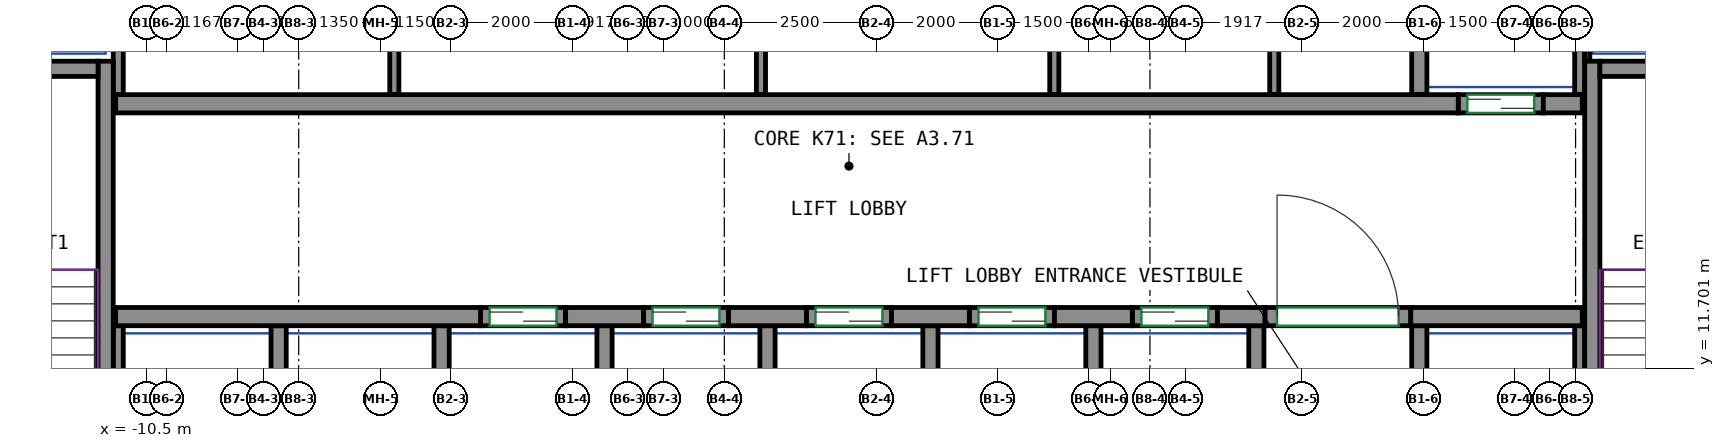
"""IFC4 building model, lengths in metres.
Left out: names, types, materials, properties, quantities, classifications, styles, units other than length and angle.
Written with IfcOpenShell. Run it as: python <this file> out.ifc"""

import sys

from ifc_helpers import new_model, si_unit, direction, frame, frame_2d, origin, place, context, subcontext, project, spatial, rectangle, extrude, source, transform, mapped, element, fill, save


model = new_model("IFC4")
c1 = context("Model", 3, precision=1e-05, world=origin(), true_north=direction((0.0, 1.0)))
c2 = subcontext(c1, "Body", "Model", "MODEL_VIEW")
j1 = project(units=[si_unit("LENGTHUNIT", "METRE"), si_unit("PLANEANGLEUNIT", "RADIAN")], contexts=[c1])
p1 = place(None, origin())
s1 = spatial("IfcSite", under=j1, at=p1, CompositionType="ELEMENT")
p2 = place(p1, origin())
s2 = spatial("IfcBuilding", under=s1, at=p2, CompositionType="ELEMENT")
p3 = place(p2, frame((0.0, 0.0, 284.0)))
s3 = spatial("IfcBuildingStorey", under=s2, at=p3, CompositionType="ELEMENT", Elevation=284.0)
m1 = source(origin(), c2, "Body", "SweptSolid", [
    extrude(rectangle(XDim=7.75, YDim=0.25, at=frame_2d((3.875, 0.0))), origin(), (0.0, 0.0, 1.0), 3.12),
])
p4 = place(p3, frame((-11.175, 9.0, 0.0), z_axis=(0.0, 0.0, 1.0), x_axis=(0.0, 1.0, 0.0)))
e1 = element("IfcWall", 1, at=p4, inside=s3, PredefinedType="SHEAR", context=c2, shape_type="MappedRepresentation", body=[
    mapped(m1, transform((0.0, 0.0, 0.0))),
])
m2 = source(origin(), c2, "Body", "SweptSolid", [
    extrude(rectangle(XDim=3.7, YDim=0.25, at=frame_2d((1.85, 0.0))), origin(), (0.0, 0.0, 1.0), 3.12),
])
p5 = place(p3, frame((-15.0, 16.625, 0.0), z_axis=(0.0, 0.0, 1.0), x_axis=(1.0, 0.0, 0.0)))
e2 = element("IfcWall", 2, at=p5, inside=s3, PredefinedType="SHEAR", context=c2, shape_type="MappedRepresentation", body=[
    mapped(m2, transform((0.0, 0.0, 0.0))),
])
p6 = place(p3, frame((13.275, 9.0, 0.0), z_axis=(0.0, 0.0, 1.0), x_axis=(0.0, 1.0, 0.0)))
e3 = element("IfcWall", 3, at=p6, inside=s3, PredefinedType="SHEAR", context=c2, shape_type="MappedRepresentation", body=[
    mapped(m1, transform((0.0, 0.0, 0.0))),
])
m3 = source(origin(), c2, "Body", "SweptSolid", [
    extrude(rectangle(XDim=3.7, YDim=0.25, at=frame_2d((1.85, 0.0))), origin(), (0.0, 0.0, 1.0), 3.12),
])
p7 = place(p3, frame((13.4, 16.625, 0.0), z_axis=(0.0, 0.0, 1.0), x_axis=(1.0, 0.0, 0.0)))
e4 = element("IfcWall", 4, at=p7, inside=s3, PredefinedType="SHEAR", context=c2, shape_type="MappedRepresentation", body=[
    mapped(m3, transform((0.0, 0.0, 0.0))),
])
m4 = source(origin(), c2, "Body", "SweptSolid", [
    extrude(rectangle(XDim=6.0, YDim=0.3, at=frame_2d((3.0, 0.0))), origin(), (0.0, 0.0, 1.0), 3.12),
])
p8 = place(p3, frame((-11.01, 12.55, 0.0), z_axis=(0.0, 0.0, 1.0), x_axis=(1.0, 0.0, 0.0)))
e5 = element("IfcWall", 5, at=p8, inside=s3, PredefinedType="SHEAR", context=c2, shape_type="MappedRepresentation", body=[
    mapped(m4, transform((0.0, 0.0, 0.0))),
])
m5 = source(origin(), c2, "Body", "SweptSolid", [
    extrude(rectangle(XDim=1.28, YDim=0.3, at=frame_2d((0.64, 0.0))), origin(), (0.0, 0.0, 1.0), 3.12),
])
for number, where, z_axis, x_axis in (
    (6, (-3.61, 12.55, 0.0), (0.0, 0.0, 1.0), (1.0, 0.0, 0.0)),
    (7, (-0.93, 12.55, 0.0), (0.0, 0.0, 1.0), (1.0, 0.0, 0.0)),
    (8, (1.75, 12.55, 0.0), (0.0, 0.0, 1.0), (1.0, 0.0, 0.0)),
    (9, (4.43, 12.55, 0.0), (0.0, 0.0, 1.0), (1.0, 0.0, 0.0)),
):
    element("IfcWall", number, at=place(p3, frame(where, z_axis=z_axis, x_axis=x_axis)), inside=s3, PredefinedType="SHEAR", context=c2, shape_type="MappedRepresentation", body=[
        mapped(m5, transform((0.0, 0.0, 0.0))),
    ])
m6 = source(origin(), c2, "Body", "SweptSolid", [
    extrude(rectangle(XDim=0.78, YDim=0.3, at=frame_2d((0.39, 0.0))), origin(), (0.0, 0.0, 1.0), 3.12),
])
p9 = place(p3, frame((7.11, 12.55, 0.0), z_axis=(0.0, 0.0, 1.0), x_axis=(1.0, 0.0, 0.0)))
e10 = element("IfcWall", 10, at=p9, inside=s3, PredefinedType="SHEAR", context=c2, shape_type="MappedRepresentation", body=[
    mapped(m6, transform((0.0, 0.0, 0.0))),
])
m7 = source(origin(), c2, "Body", "SweptSolid", [
    extrude(rectangle(XDim=2.82, YDim=0.3, at=frame_2d((1.41, 0.0))), origin(), (0.0, 0.0, 1.0), 3.12),
])
p10 = place(p3, frame((10.29, 12.55, 0.0), z_axis=(0.0, 0.0, 1.0), x_axis=(1.0, 0.0, 0.0)))
e11 = element("IfcWall", 11, at=p10, inside=s3, PredefinedType="SHEAR", context=c2, shape_type="MappedRepresentation", body=[
    mapped(m7, transform((0.0, 0.0, 0.0))),
])
m8 = source(origin(), c2, "Body", "SweptSolid", [
    extrude(rectangle(XDim=22.08, YDim=0.3, at=frame_2d((11.04, 0.0))), origin(), (0.0, 0.0, 1.0), 3.12),
])
p11 = place(p3, frame((-11.01, 16.05, 0.0), z_axis=(0.0, 0.0, 1.0), x_axis=(1.0, 0.0, 0.0)))
e12 = element("IfcWall", 12, at=p11, inside=s3, PredefinedType="SHEAR", context=c2, shape_type="MappedRepresentation", body=[
    mapped(m8, transform((0.0, 0.0, 0.0))),
])
m9 = source(origin(), c2, "Body", "SweptSolid", [
    extrude(rectangle(XDim=0.64, YDim=0.3, at=frame_2d((0.32, 0.0))), origin(), (0.0, 0.0, 1.0), 3.12),
])
p12 = place(p3, frame((12.47, 16.05, 0.0), z_axis=(0.0, 0.0, 1.0), x_axis=(1.0, 0.0, 0.0)))
e13 = element("IfcWall", 13, at=p12, inside=s3, PredefinedType="SHEAR", context=c2, shape_type="MappedRepresentation", body=[
    mapped(m9, transform((0.0, 0.0, 0.0))),
])
m10 = source(origin(), c2, "Body", "SweptSolid", [
    extrude(rectangle(XDim=1.4, YDim=0.3, at=frame_2d((0.7, 0.0))), origin(), (0.0, 0.0, 1.0), 3.12),
])
p13 = place(p3, frame((-5.01, 12.55, 0.0), z_axis=(0.0, 0.0, 1.0), x_axis=(1.0, 0.0, 0.0)))
e14 = element("IfcWall", 14, at=p13, inside=s3, PredefinedType="PARTITIONING", context=c2, shape_type="MappedRepresentation", body=[
    mapped(m10, transform((0.0, 0.0, 0.0))),
])
p14 = place(p13, frame((0.15, 0.0, 0.0)))
e15 = element("IfcOpeningElement", 15, at=p14, cuts=e14, PredefinedType="OPENING", context=c2, shape_type="SweptSolid", body=[
    extrude(rectangle(XDim=1.1, YDim=2.1, at=frame_2d((0.55, 1.05))), frame((0.0, 0.16, 0.0), z_axis=(0.0, -1.0, 0.0), x_axis=(1.0, 0.0, 0.0)), (0.0, 0.0, 1.0), 0.32),
])
m11 = source(origin(), c2, "Body", "SweptSolid", [
    extrude(rectangle(XDim=1.4, YDim=0.3, at=frame_2d((0.7, 0.0))), origin(), (0.0, 0.0, 1.0), 3.12),
])
p15 = place(p3, frame((-2.33, 12.55, 0.0), z_axis=(0.0, 0.0, 1.0), x_axis=(1.0, 0.0, 0.0)))
e16 = element("IfcWall", 16, at=p15, inside=s3, PredefinedType="PARTITIONING", context=c2, shape_type="MappedRepresentation", body=[
    mapped(m11, transform((0.0, 0.0, 0.0))),
])
p16 = place(p15, frame((0.15, 0.0, 0.0)))
e17 = element("IfcOpeningElement", 17, at=p16, cuts=e16, PredefinedType="OPENING", context=c2, shape_type="SweptSolid", body=[
    extrude(rectangle(XDim=1.1, YDim=2.1, at=frame_2d((0.55, 1.05))), frame((0.0, 0.16, 0.0), z_axis=(0.0, -1.0, 0.0), x_axis=(1.0, 0.0, 0.0)), (0.0, 0.0, 1.0), 0.32),
])
p17 = place(p3, frame((0.35, 12.55, 0.0), z_axis=(0.0, 0.0, 1.0), x_axis=(1.0, 0.0, 0.0)))
e18 = element("IfcWall", 18, at=p17, inside=s3, PredefinedType="PARTITIONING", context=c2, shape_type="MappedRepresentation", body=[
    mapped(m10, transform((0.0, 0.0, 0.0))),
])
p18 = place(p17, frame((0.15, 0.0, 0.0)))
e19 = element("IfcOpeningElement", 19, at=p18, cuts=e18, PredefinedType="OPENING", context=c2, shape_type="SweptSolid", body=[
    extrude(rectangle(XDim=1.1, YDim=2.1, at=frame_2d((0.55, 1.05))), frame((0.0, 0.16, 0.0), z_axis=(0.0, -1.0, 0.0), x_axis=(1.0, 0.0, 0.0)), (0.0, 0.0, 1.0), 0.32),
])
p19 = place(p3, frame((3.03, 12.55, 0.0), z_axis=(0.0, 0.0, 1.0), x_axis=(1.0, 0.0, 0.0)))
e20 = element("IfcWall", 20, at=p19, inside=s3, PredefinedType="PARTITIONING", context=c2, shape_type="MappedRepresentation", body=[
    mapped(m10, transform((0.0, 0.0, 0.0))),
])
p20 = place(p19, frame((0.15, 0.0, 0.0)))
e21 = element("IfcOpeningElement", 21, at=p20, cuts=e20, PredefinedType="OPENING", context=c2, shape_type="SweptSolid", body=[
    extrude(rectangle(XDim=1.1, YDim=2.1, at=frame_2d((0.55, 1.05))), frame((0.0, 0.16, 0.0), z_axis=(0.0, -1.0, 0.0), x_axis=(1.0, 0.0, 0.0)), (0.0, 0.0, 1.0), 0.32),
])
p21 = place(p3, frame((5.71, 12.55, 0.0), z_axis=(0.0, 0.0, 1.0), x_axis=(1.0, 0.0, 0.0)))
e22 = element("IfcWall", 22, at=p21, inside=s3, PredefinedType="PARTITIONING", context=c2, shape_type="MappedRepresentation", body=[
    mapped(m11, transform((0.0, 0.0, 0.0))),
])
p22 = place(p21, frame((0.15, 0.0, 0.0)))
e23 = element("IfcOpeningElement", 23, at=p22, cuts=e22, PredefinedType="OPENING", context=c2, shape_type="SweptSolid", body=[
    extrude(rectangle(XDim=1.1, YDim=2.1, at=frame_2d((0.55, 1.05))), frame((0.0, 0.16, 0.0), z_axis=(0.0, -1.0, 0.0), x_axis=(1.0, 0.0, 0.0)), (0.0, 0.0, 1.0), 0.32),
])
p23 = place(p3, frame((11.07, 16.05, 0.0), z_axis=(0.0, 0.0, 1.0), x_axis=(1.0, 0.0, 0.0)))
e24 = element("IfcWall", 24, at=p23, inside=s3, PredefinedType="PARTITIONING", context=c2, shape_type="MappedRepresentation", body=[
    mapped(m10, transform((0.0, 0.0, 0.0))),
])
p24 = place(p23, frame((0.15, 0.0, 0.0)))
e25 = element("IfcOpeningElement", 25, at=p24, cuts=e24, PredefinedType="OPENING", context=c2, shape_type="SweptSolid", body=[
    extrude(rectangle(XDim=1.1, YDim=2.1, at=frame_2d((0.55, 1.05))), frame((0.0, 0.16, 0.0), z_axis=(0.0, -1.0, 0.0), x_axis=(1.0, 0.0, 0.0)), (0.0, 0.0, 1.0), 0.32),
])
m12 = source(origin(), c2, "Body", "SweptSolid", [
    extrude(rectangle(XDim=2.4, YDim=0.3, at=frame_2d((1.2, 0.0))), origin(), (0.0, 0.0, 1.0), 3.12),
])
p25 = place(p3, frame((7.89, 12.55, 0.0), z_axis=(0.0, 0.0, 1.0), x_axis=(1.0, 0.0, 0.0)))
e26 = element("IfcWall", 26, at=p25, inside=s3, PredefinedType="PARTITIONING", context=c2, shape_type="MappedRepresentation", body=[
    mapped(m12, transform((0.0, 0.0, 0.0))),
])
p26 = place(p25, frame((0.2, 0.0, 0.0)))
e27 = element("IfcOpeningElement", 27, at=p26, cuts=e26, PredefinedType="OPENING", context=c2, shape_type="SweptSolid", body=[
    extrude(rectangle(XDim=2.0, YDim=2.1, at=frame_2d((1.0, 1.05))), frame((0.0, 0.16, 0.0), z_axis=(0.0, -1.0, 0.0), x_axis=(1.0, 0.0, 0.0)), (0.0, 0.0, 1.0), 0.32),
])
m13 = source(origin(), c2, "Body", "SweptSolid", [
    extrude(rectangle(XDim=3.275, YDim=0.165, at=frame_2d((1.638, 0.0))), origin(), (0.0, 0.0, 1.0), 3.12),
])
p27 = place(p3, frame((13.067, 16.2, 0.0), z_axis=(0.0, 0.0, 1.0), x_axis=(0.0, 1.0, 0.0)))
e28 = element("IfcWall", 28, at=p27, inside=s3, PredefinedType="PARTITIONING", context=c2, shape_type="MappedRepresentation", body=[
    mapped(m13, transform((0.0, 0.0, 0.0))),
])
m14 = source(origin(), c2, "Body", "SweptSolid", [
    extrude(rectangle(XDim=4.8, YDim=0.165, at=frame_2d((2.4, 0.0))), origin(), (0.0, 0.0, 1.0), 3.12),
])
p28 = place(p3, frame((-10.968, 16.2, 0.0), z_axis=(0.0, 0.0, 1.0), x_axis=(0.0, 1.0, 0.0)))
e29 = element("IfcWall", 29, at=p28, inside=s3, PredefinedType="PARTITIONING", context=c2, shape_type="MappedRepresentation", body=[
    mapped(m14, transform((0.0, 0.0, 0.0))),
])
m15 = source(origin(), c2, "Body", "SweptSolid", [
    extrude(rectangle(XDim=3.275, YDim=0.25, at=frame_2d((1.638, 0.0))), origin(), (0.0, 0.0, 1.0), 3.12),
])
p29 = place(p3, frame((10.43, 16.2, 0.0), z_axis=(0.0, 0.0, 1.0), x_axis=(0.0, 1.0, 0.0)))
e30 = element("IfcWall", 30, at=p29, inside=s3, PredefinedType="PARTITIONING", context=c2, shape_type="MappedRepresentation", body=[
    mapped(m15, transform((0.0, 0.0, 0.0))),
])
m16 = source(origin(), c2, "Body", "SweptSolid", [
    extrude(rectangle(XDim=2.725, YDim=0.085, at=frame_2d((1.363, 0.0))), origin(), (0.0, 0.0, 1.0), 3.12),
])
p30 = place(p3, frame((13.192, 16.75, 0.0), z_axis=(0.0, 0.0, 1.0), x_axis=(0.0, 1.0, 0.0)))
e31 = element("IfcWall", 31, at=p30, inside=s3, PredefinedType="PARTITIONING", context=c2, shape_type="MappedRepresentation", body=[
    mapped(m16, transform((0.0, 0.0, 0.0))),
])
m17 = source(origin(), c2, "Body", "SweptSolid", [
    extrude(rectangle(XDim=3.4, YDim=0.25, at=frame_2d((1.7, 0.0))), origin(), (0.0, 0.0, 1.0), 3.12),
])
p31 = place(p3, frame((10.43, 9.0, 0.0), z_axis=(0.0, 0.0, 1.0), x_axis=(0.0, 1.0, 0.0)))
e32 = element("IfcWall", 32, at=p31, inside=s3, PredefinedType="PARTITIONING", context=c2, shape_type="MappedRepresentation", body=[
    mapped(m17, transform((0.0, 0.0, 0.0))),
])
m18 = source(origin(), c2, "Body", "SweptSolid", [
    extrude(rectangle(XDim=3.4, YDim=0.165, at=frame_2d((1.7, 0.0))), origin(), (0.0, 0.0, 1.0), 3.12),
])
p32 = place(p3, frame((13.067, 9.0, 0.0), z_axis=(0.0, 0.0, 1.0), x_axis=(0.0, 1.0, 0.0)))
e33 = element("IfcWall", 33, at=p32, inside=s3, PredefinedType="PARTITIONING", context=c2, shape_type="MappedRepresentation", body=[
    mapped(m18, transform((0.0, 0.0, 0.0))),
])
for number, where, z_axis, x_axis in (
    (34, (2.39, 9.0, 0.0), (0.0, 0.0, 1.0), (0.0, 1.0, 0.0)),
    (35, (5.07, 9.0, 0.0), (0.0, 0.0, 1.0), (0.0, 1.0, 0.0)),
    (36, (7.75, 9.0, 0.0), (0.0, 0.0, 1.0), (0.0, 1.0, 0.0)),
    (37, (-0.29, 9.0, 0.0), (0.0, 0.0, 1.0), (0.0, 1.0, 0.0)),
):
    element("IfcWall", number, at=place(p3, frame(where, z_axis=z_axis, x_axis=x_axis)), inside=s3, PredefinedType="PARTITIONING", context=c2, shape_type="MappedRepresentation", body=[
        mapped(m17, transform((0.0, 0.0, 0.0))),
    ])
p33 = place(p3, frame((-10.968, 9.0, 0.0), z_axis=(0.0, 0.0, 1.0), x_axis=(0.0, 1.0, 0.0)))
e38 = element("IfcWall", 38, at=p33, inside=s3, PredefinedType="PARTITIONING", context=c2, shape_type="MappedRepresentation", body=[
    mapped(m18, transform((0.0, 0.0, 0.0))),
])
for number, where, z_axis, x_axis in (
    (39, (-2.97, 9.0, 0.0), (0.0, 0.0, 1.0), (0.0, 1.0, 0.0)),
    (40, (-5.65, 9.0, 0.0), (0.0, 0.0, 1.0), (0.0, 1.0, 0.0)),
    (41, (-8.33, 9.0, 0.0), (0.0, 0.0, 1.0), (0.0, 1.0, 0.0)),
):
    element("IfcWall", number, at=place(p3, frame(where, z_axis=z_axis, x_axis=x_axis)), inside=s3, PredefinedType="PARTITIONING", context=c2, shape_type="MappedRepresentation", body=[
        mapped(m17, transform((0.0, 0.0, 0.0))),
    ])
m19 = source(origin(), c2, "Body", "SweptSolid", [
    extrude(rectangle(XDim=4.8, YDim=0.15, at=frame_2d((2.4, 0.0))), origin(), (0.0, 0.0, 1.0), 3.12),
])
for number, where, z_axis, x_axis in (
    (42, (-6.427, 16.2, 0.0), (0.0, 0.0, 1.0), (0.0, 1.0, 0.0)),
    (43, (-0.397, 16.2, 0.0), (0.0, 0.0, 1.0), (0.0, 1.0, 0.0)),
    (44, (4.427, 16.2, 0.0), (0.0, 0.0, 1.0), (0.0, 1.0, 0.0)),
    (45, (8.045, 16.2, 0.0), (0.0, 0.0, 1.0), (0.0, 1.0, 0.0)),
):
    element("IfcWall", number, at=place(p3, frame(where, z_axis=z_axis, x_axis=x_axis)), inside=s3, PredefinedType="PARTITIONING", context=c2, shape_type="MappedRepresentation", body=[
        mapped(m19, transform((0.0, 0.0, 0.0))),
    ])
p34 = place(p26, origin())
e46 = element("IfcDoor", 46, at=p34, inside=s3, OperationType="DOUBLE_DOOR_SINGLE_SWING", PredefinedType="DOOR", context=c2, shape_type="SweptSolid", body=[
    extrude(rectangle(XDim=2.0, YDim=2.1, at=frame_2d((1.0, 1.05))), frame((0.0, 0.025, 0.0), z_axis=(0.0, -1.0, 0.0), x_axis=(1.0, 0.0, 0.0)), (0.0, 0.0, 1.0), 0.05),
])
fill(e27, e46)
p35 = place(p14, origin())
e47 = element("IfcDoor", 47, at=p35, inside=s3, OperationType="DOUBLE_DOOR_SLIDING", PredefinedType="DOOR", context=c2, shape_type="SweptSolid", body=[
    extrude(rectangle(XDim=1.1, YDim=2.1, at=frame_2d((0.55, 1.05))), frame((0.0, 0.025, 0.0), z_axis=(0.0, -1.0, 0.0), x_axis=(1.0, 0.0, 0.0)), (0.0, 0.0, 1.0), 0.05),
])
fill(e15, e47)
p36 = place(p16, origin())
e48 = element("IfcDoor", 48, at=p36, inside=s3, OperationType="DOUBLE_DOOR_SLIDING", PredefinedType="DOOR", context=c2, shape_type="SweptSolid", body=[
    extrude(rectangle(XDim=1.1, YDim=2.1, at=frame_2d((0.55, 1.05))), frame((0.0, 0.025, 0.0), z_axis=(0.0, -1.0, 0.0), x_axis=(1.0, 0.0, 0.0)), (0.0, 0.0, 1.0), 0.05),
])
fill(e17, e48)
p37 = place(p18, origin())
e49 = element("IfcDoor", 49, at=p37, inside=s3, OperationType="DOUBLE_DOOR_SLIDING", PredefinedType="DOOR", context=c2, shape_type="SweptSolid", body=[
    extrude(rectangle(XDim=1.1, YDim=2.1, at=frame_2d((0.55, 1.05))), frame((0.0, 0.025, 0.0), z_axis=(0.0, -1.0, 0.0), x_axis=(1.0, 0.0, 0.0)), (0.0, 0.0, 1.0), 0.05),
])
fill(e19, e49)
p38 = place(p20, origin())
e50 = element("IfcDoor", 50, at=p38, inside=s3, OperationType="DOUBLE_DOOR_SLIDING", PredefinedType="DOOR", context=c2, shape_type="SweptSolid", body=[
    extrude(rectangle(XDim=1.1, YDim=2.1, at=frame_2d((0.55, 1.05))), frame((0.0, 0.025, 0.0), z_axis=(0.0, -1.0, 0.0), x_axis=(1.0, 0.0, 0.0)), (0.0, 0.0, 1.0), 0.05),
])
fill(e21, e50)
p39 = place(p22, origin())
e51 = element("IfcDoor", 51, at=p39, inside=s3, OperationType="DOUBLE_DOOR_SLIDING", PredefinedType="DOOR", context=c2, shape_type="SweptSolid", body=[
    extrude(rectangle(XDim=1.1, YDim=2.1, at=frame_2d((0.55, 1.05))), frame((0.0, 0.025, 0.0), z_axis=(0.0, -1.0, 0.0), x_axis=(1.0, 0.0, 0.0)), (0.0, 0.0, 1.0), 0.05),
])
fill(e23, e51)
p40 = place(p24, origin())
e52 = element("IfcDoor", 52, at=p40, inside=s3, OperationType="DOUBLE_DOOR_SLIDING", PredefinedType="DOOR", context=c2, shape_type="SweptSolid", body=[
    extrude(rectangle(XDim=1.1, YDim=2.1, at=frame_2d((0.55, 1.05))), frame((0.0, 0.025, 0.0), z_axis=(0.0, -1.0, 0.0), x_axis=(1.0, 0.0, 0.0)), (0.0, 0.0, 1.0), 0.05),
])
fill(e25, e52)
save(model, sys.argv[1])
